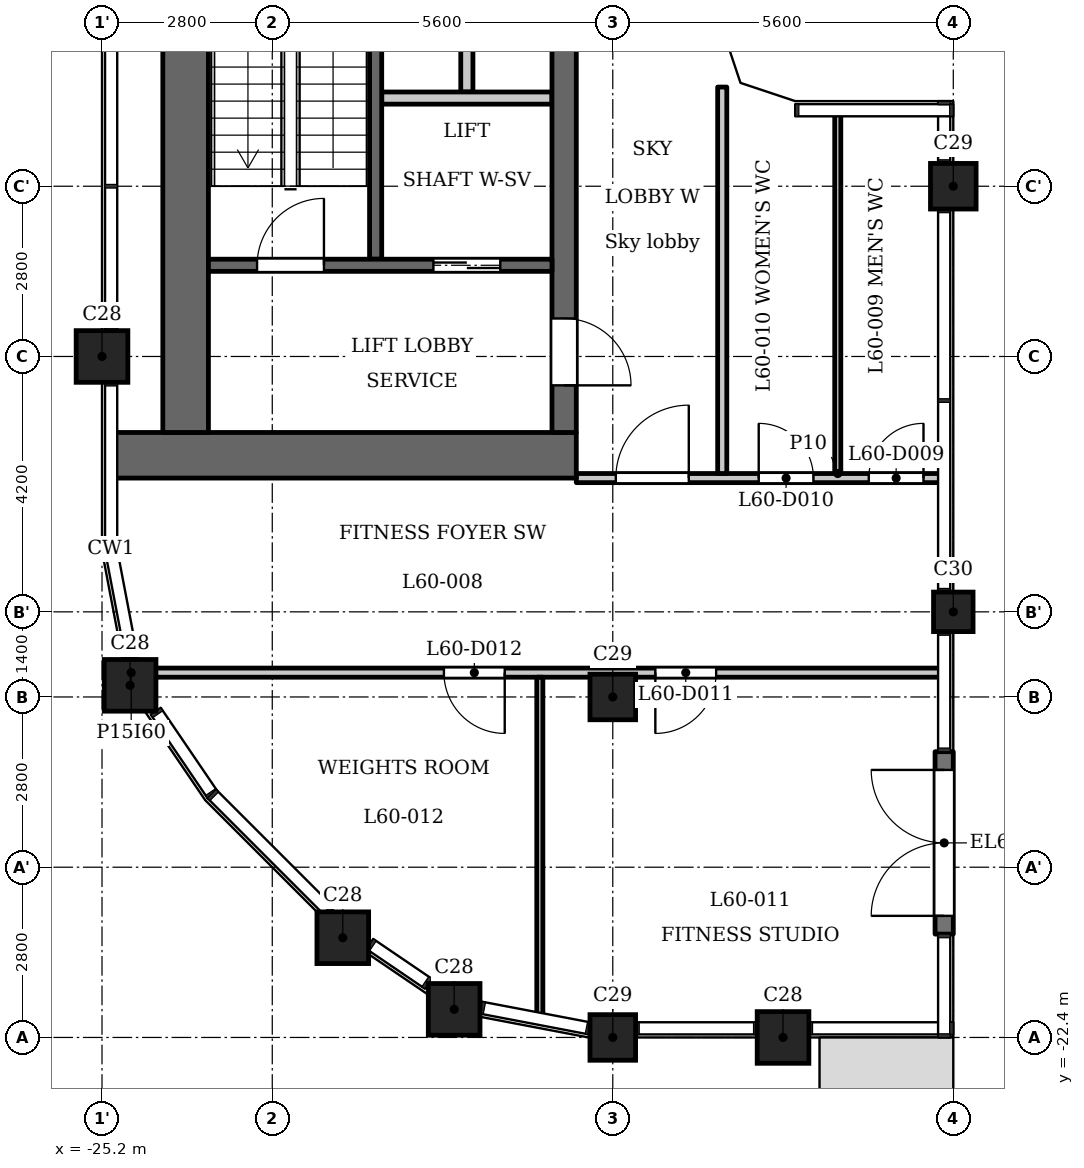
"""IFC4 building model, lengths in metres.
Left out: names, types, materials, properties, quantities, classifications, styles, units other than length and angle.
Written with IfcOpenShell. Run it as: python <this file> out.ifc"""

import sys

from ifc_helpers import new_model, si_unit, direction, frame, frame_2d, origin, origin_2d, place, context, subcontext, project, spatial, polyline, rectangle, outline, extrude, element, fill, save


model = new_model("IFC4")
c1 = context("Model", 3, precision=1e-05, world=origin(), true_north=direction((0.0, 1.0)))
c2 = subcontext(c1, "Body", "Model", "MODEL_VIEW")
j1 = project(units=[si_unit("LENGTHUNIT", "METRE"), si_unit("PLANEANGLEUNIT", "RADIAN")], contexts=[c1])
p1 = place(None, origin())
s1 = spatial("IfcSite", under=j1, at=p1, CompositionType="ELEMENT")
p2 = place(p1, origin())
s2 = spatial("IfcBuilding", under=s1, at=p2, CompositionType="ELEMENT")
p3 = place(p2, frame((0.0, 0.0, 230.9)))
s3 = spatial("IfcBuildingStorey", under=s2, at=p3, CompositionType="ELEMENT", Elevation=230.9)
for number, where, z_axis, x_axis in (
    (1, (-19.409, -21.938, 0.0), (0.0, 0.0, 1.0), (1.0, 0.0, 0.0)),
    (2, (-14.0, -22.4, 0.0), (0.0, 0.0, 1.0), (1.0, 0.0, 0.0)),
    (3, (-25.2, -11.2, 0.0), (0.0, 0.0, 1.0), (1.0, 0.0, 0.0)),
    (4, (-24.738, -16.609, 0.0), (0.0, 0.0, 1.0), (1.0, 0.0, 0.0)),
    (5, (-21.24, -20.76, 0.0), (0.0, 0.0, 1.0), (1.0, 0.0, 0.0)),
):
    element("IfcColumn", number, at=place(p3, frame(where, z_axis=z_axis, x_axis=x_axis)), inside=s3, PredefinedType="COLUMN", context=c2, shape_type="SweptSolid", body=[
        extrude(rectangle(XDim=0.85, YDim=0.85, at=origin_2d()), origin(), (0.0, 0.0, 1.0), 5.4),
    ])
for number, where, z_axis, x_axis in (
    (6, (-16.8, -22.4, 0.0), (0.0, 0.0, 1.0), (1.0, 0.0, 0.0)),
    (7, (-16.8, -16.8, 0.0), (0.0, 0.0, 1.0), (1.0, 0.0, 0.0)),
    (8, (-11.2, -8.4, 0.0), (0.0, 0.0, 1.0), (1.0, 0.0, 0.0)),
):
    element("IfcColumn", number, at=place(p3, frame(where, z_axis=z_axis, x_axis=x_axis)), inside=s3, PredefinedType="COLUMN", context=c2, shape_type="SweptSolid", body=[
        extrude(rectangle(XDim=0.75, YDim=0.75, at=origin_2d()), origin(), (0.0, 0.0, 1.0), 5.4),
    ])
p4 = place(p3, frame((-11.2, -15.4, 0.0), z_axis=(0.0, 0.0, 1.0), x_axis=(1.0, 0.0, 0.0)))
e9 = element("IfcColumn", 9, at=p4, inside=s3, PredefinedType="COLUMN", context=c2, shape_type="SweptSolid", body=[
    extrude(rectangle(XDim=0.65, YDim=0.65, at=origin_2d()), origin(), (0.0, 0.0, 1.0), 5.4),
])
p5 = place(p3, frame((-11.35, -20.7, 0.0), z_axis=(0.0, 0.0, 1.0), x_axis=(0.0, 1.0, 0.0)))
e10 = element("IfcWall", 10, at=p5, inside=s3, PredefinedType="SOLIDWALL", context=c2, shape_type="SweptSolid", body=[
    extrude(rectangle(XDim=3.0, YDim=0.3, at=frame_2d((1.5, 0.0))), origin(), (0.0, 0.0, 1.0), 4.95),
])
p6 = place(p5, frame((0.3, 0.0, 0.0)))
e11 = element("IfcOpeningElement", 11, at=p6, cuts=e10, PredefinedType="OPENING", context=c2, shape_type="SweptSolid", body=[
    extrude(rectangle(XDim=2.4, YDim=2.3, at=frame_2d((1.2, 1.15))), frame((0.0, 0.16, 0.0), z_axis=(0.0, -1.0, 0.0), x_axis=(1.0, 0.0, 0.0)), (0.0, 0.0, 1.0), 0.32),
])
p7 = place(p3, frame((-20.7, -9.6, 0.0), z_axis=(0.0, 0.0, 1.0), x_axis=(0.0, 1.0, 0.0)))
e12 = element("IfcWall", 12, at=p7, inside=s3, PredefinedType="SHEAR", context=c2, shape_type="SweptSolid", body=[
    extrude(rectangle(XDim=9.75, YDim=0.2, at=frame_2d((4.875, 0.0))), origin(), (0.0, 0.0, 1.0), 4.95),
])
p8 = place(p3, frame((-17.4, -12.825, 0.0), z_axis=(0.0, 0.0, 1.0), x_axis=(-1.0, 0.0, 0.0)))
e13 = element("IfcWall", 13, at=p8, inside=s3, PredefinedType="SHEAR", context=c2, shape_type="SweptSolid", body=[
    extrude(rectangle(XDim=7.6, YDim=0.75, at=frame_2d((3.8, 0.0))), origin(), (0.0, 0.0, 1.0), 4.95),
])
p9 = place(p3, frame((-19.2, -6.85, 0.0), z_axis=(0.0, 0.0, 1.0), x_axis=(0.0, 1.0, 0.0)))
e14 = element("IfcWall", 14, at=p9, inside=s3, PredefinedType="PARTITIONING", context=c2, shape_type="SweptSolid", body=[
    extrude(rectangle(XDim=7.0, YDim=0.2, at=frame_2d((3.5, 0.0))), origin(), (0.0, 0.0, 1.0), 4.95),
])
p10 = place(p3, frame((-17.6, -12.45, 0.0), z_axis=(0.0, 0.0, 1.0), x_axis=(0.0, 1.0, 0.0)))
e15 = element("IfcWall", 15, at=p10, inside=s3, PredefinedType="SHEAR", context=c2, shape_type="SweptSolid", body=[
    extrude(rectangle(XDim=24.9, YDim=0.4, at=frame_2d((12.45, 0.0))), origin(), (0.0, 0.0, 1.0), 4.95),
])
p11 = place(p10, frame((8.65, 0.0, 0.0)))
e16 = element("IfcOpeningElement", 16, at=p11, cuts=e15, PredefinedType="OPENING", context=c2, shape_type="SweptSolid", body=[
    extrude(rectangle(XDim=0.9, YDim=2.1, at=frame_2d((0.45, 1.05))), frame((0.0, 0.21, 0.0), z_axis=(0.0, -1.0, 0.0), x_axis=(1.0, 0.0, 0.0)), (0.0, 0.0, 1.0), 0.42),
])
p12 = place(p10, frame((15.6, 0.0, 0.0)))
e17 = element("IfcOpeningElement", 17, at=p12, cuts=e15, PredefinedType="OPENING", context=c2, shape_type="SweptSolid", body=[
    extrude(rectangle(XDim=1.1, YDim=2.1, at=frame_2d((0.55, 1.05))), frame((0.0, 0.21, 0.0), z_axis=(0.0, -1.0, 0.0), x_axis=(1.0, 0.0, 0.0)), (0.0, 0.0, 1.0), 0.42),
])
p13 = place(p10, frame((18.0, 0.0, 0.0)))
e18 = element("IfcOpeningElement", 18, at=p13, cuts=e15, PredefinedType="OPENING", context=c2, shape_type="SweptSolid", body=[
    extrude(rectangle(XDim=1.1, YDim=2.1, at=frame_2d((0.55, 1.05))), frame((0.0, 0.21, 0.0), z_axis=(0.0, -1.0, 0.0), x_axis=(1.0, 0.0, 0.0)), (0.0, 0.0, 1.0), 0.42),
])
p14 = place(p10, frame((23.025, 0.0, 0.0)))
e19 = element("IfcOpeningElement", 19, at=p14, cuts=e15, PredefinedType="OPENING", context=c2, shape_type="SweptSolid", body=[
    extrude(rectangle(XDim=1.1, YDim=2.1, at=frame_2d((0.55, 1.05))), frame((0.0, 0.21, 0.0), z_axis=(0.0, -1.0, 0.0), x_axis=(1.0, 0.0, 0.0)), (0.0, 0.0, 1.0), 0.42),
])
p15 = place(p10, frame((0.775, 0.0, 0.0)))
e20 = element("IfcOpeningElement", 20, at=p15, cuts=e15, PredefinedType="OPENING", context=c2, shape_type="SweptSolid", body=[
    extrude(rectangle(XDim=1.1, YDim=2.1, at=frame_2d((0.55, 1.05))), frame((0.0, 0.21, 0.0), z_axis=(0.0, -1.0, 0.0), x_axis=(1.0, 0.0, 0.0)), (0.0, 0.0, 1.0), 0.42),
])
p16 = place(p10, frame((12.925, 0.0, 0.0)))
e21 = element("IfcOpeningElement", 21, at=p16, cuts=e15, PredefinedType="OPENING", context=c2, shape_type="SweptSolid", body=[
    extrude(rectangle(XDim=1.8, YDim=2.1, at=frame_2d((0.9, 1.05))), frame((0.0, 0.21, 0.0), z_axis=(0.0, -1.0, 0.0), x_axis=(1.0, 0.0, 0.0)), (0.0, 0.0, 1.0), 0.42),
])
p17 = place(p3, frame((-23.825, -12.45, 0.0), z_axis=(0.0, 0.0, 1.0), x_axis=(0.0, 1.0, 0.0)))
e22 = element("IfcWall", 22, at=p17, inside=s3, PredefinedType="SHEAR", context=c2, shape_type="SweptSolid", body=[
    extrude(rectangle(XDim=24.9, YDim=0.75, at=frame_2d((12.45, 0.0))), origin(), (0.0, 0.0, 1.0), 4.95),
])
p18 = place(p3, frame((-17.8, -9.7, 0.0), z_axis=(0.0, 0.0, 1.0), x_axis=(-1.0, 0.0, 0.0)))
e23 = element("IfcWall", 23, at=p18, inside=s3, PredefinedType="SHEAR", context=c2, shape_type="SweptSolid", body=[
    extrude(rectangle(XDim=5.65, YDim=0.2, at=frame_2d((2.825, 0.0))), origin(), (0.0, 0.0, 1.0), 4.95),
])
p19 = place(p18, frame((0.85, 0.0, 0.0)))
e24 = element("IfcOpeningElement", 24, at=p19, cuts=e23, PredefinedType="OPENING", context=c2, shape_type="SweptSolid", body=[
    extrude(rectangle(XDim=1.1, YDim=2.1, at=frame_2d((0.55, 1.05))), frame((0.0, 0.11, 0.0), z_axis=(0.0, -1.0, 0.0), x_axis=(1.0, 0.0, 0.0)), (0.0, 0.0, 1.0), 0.22),
])
p20 = place(p18, frame((3.75, 0.0, 0.0)))
e25 = element("IfcOpeningElement", 25, at=p20, cuts=e23, PredefinedType="OPENING", context=c2, shape_type="SweptSolid", body=[
    extrude(rectangle(XDim=1.1, YDim=2.1, at=frame_2d((0.55, 1.05))), frame((0.0, 0.11, 0.0), z_axis=(0.0, -1.0, 0.0), x_axis=(1.0, 0.0, 0.0)), (0.0, 0.0, 1.0), 0.22),
])
p21 = place(p3, frame((-17.8, -6.95, 0.0), z_axis=(0.0, 0.0, 1.0), x_axis=(-1.0, 0.0, 0.0)))
e26 = element("IfcWall", 26, at=p21, inside=s3, PredefinedType="PARTITIONING", context=c2, shape_type="SweptSolid", body=[
    extrude(rectangle(XDim=2.8, YDim=0.2, at=frame_2d((1.4, 0.0))), origin(), (0.0, 0.0, 1.0), 4.95),
])
p22 = place(p3, frame((-24.72, -16.4, 0.0), z_axis=(0.0, 0.0, 1.0), x_axis=(1.0, 0.0, 0.0)))
e27 = element("IfcWall", 27, at=p22, inside=s3, PredefinedType="PARTITIONING", context=c2, shape_type="SweptSolid", body=[
    extrude(rectangle(XDim=13.336, YDim=0.15, at=frame_2d((6.668, 0.0))), origin(), (0.0, 0.0, 1.0), 4.95),
])
p23 = place(p22, frame((8.62, 0.0, 0.0)))
e28 = element("IfcOpeningElement", 28, at=p23, cuts=e27, PredefinedType="OPENING", context=c2, shape_type="SweptSolid", body=[
    extrude(rectangle(XDim=1.0, YDim=2.1, at=frame_2d((0.5, 1.05))), frame((0.0, 0.085, 0.0), z_axis=(0.0, -1.0, 0.0), x_axis=(1.0, 0.0, 0.0)), (0.0, 0.0, 1.0), 0.17),
])
p24 = place(p22, frame((5.143, 0.0, 0.0)))
e29 = element("IfcOpeningElement", 29, at=p24, cuts=e27, PredefinedType="OPENING", context=c2, shape_type="SweptSolid", body=[
    extrude(rectangle(XDim=1.0, YDim=2.1, at=frame_2d((0.5, 1.05))), frame((0.0, 0.085, 0.0), z_axis=(0.0, -1.0, 0.0), x_axis=(1.0, 0.0, 0.0)), (0.0, 0.0, 1.0), 0.17),
])
p25 = place(p3, frame((-17.4, -13.2, 0.0), z_axis=(0.0, 0.0, 1.0), x_axis=(1.0, 0.0, 0.0)))
e30 = element("IfcWall", 30, at=p25, inside=s3, PredefinedType="PARTITIONING", context=c2, shape_type="SweptSolid", body=[
    extrude(rectangle(XDim=6.016, YDim=0.15, at=frame_2d((3.008, 0.0))), origin(), (0.0, 0.0, 1.0), 4.95),
])
p26 = place(p25, frame((0.65, 0.0, 0.0)))
e31 = element("IfcOpeningElement", 31, at=p26, cuts=e30, PredefinedType="OPENING", context=c2, shape_type="SweptSolid", body=[
    extrude(rectangle(XDim=1.2, YDim=2.1, at=frame_2d((0.6, 1.05))), frame((0.0, 0.085, 0.0), z_axis=(0.0, -1.0, 0.0), x_axis=(1.0, 0.0, 0.0)), (0.0, 0.0, 1.0), 0.17),
])
p27 = place(p25, frame((4.81, 0.0, 0.0)))
e32 = element("IfcOpeningElement", 32, at=p27, cuts=e30, PredefinedType="OPENING", context=c2, shape_type="SweptSolid", body=[
    extrude(rectangle(XDim=0.9, YDim=2.1, at=frame_2d((0.45, 1.05))), frame((0.0, 0.085, 0.0), z_axis=(0.0, -1.0, 0.0), x_axis=(1.0, 0.0, 0.0)), (0.0, 0.0, 1.0), 0.17),
])
p28 = place(p25, frame((3.0, 0.0, 0.0)))
e33 = element("IfcOpeningElement", 33, at=p28, cuts=e30, PredefinedType="OPENING", context=c2, shape_type="SweptSolid", body=[
    extrude(rectangle(XDim=0.9, YDim=2.1, at=frame_2d((0.45, 1.05))), frame((0.0, 0.085, 0.0), z_axis=(0.0, -1.0, 0.0), x_axis=(1.0, 0.0, 0.0)), (0.0, 0.0, 1.0), 0.17),
])
p29 = place(p3, frame((-18.0, -22.06, 0.0), z_axis=(0.0, 0.0, 1.0), x_axis=(0.0, 1.0, 0.0)))
e34 = element("IfcWall", 34, at=p29, inside=s3, PredefinedType="PARTITIONING", context=c2, shape_type="SweptSolid", body=[
    extrude(rectangle(XDim=5.585, YDim=0.1, at=frame_2d((2.792, 0.0))), origin(), (0.0, 0.0, 1.0), 4.95),
])
p30 = place(p3, frame((-15.0, -13.125, 0.0), z_axis=(0.0, 0.0, 1.0), x_axis=(0.0, 1.0, 0.0)))
e35 = element("IfcWall", 35, at=p30, inside=s3, PredefinedType="PARTITIONING", context=c2, shape_type="SweptSolid", body=[
    extrude(rectangle(XDim=6.356, YDim=0.15, at=frame_2d((3.178, 0.0))), origin(), (0.0, 0.0, 1.0), 4.95),
])
p31 = place(p3, frame((-13.1, -13.125, 0.0), z_axis=(0.0, 0.0, 1.0), x_axis=(0.0, 1.0, 0.0)))
e36 = element("IfcWall", 36, at=p31, inside=s3, PredefinedType="PARTITIONING", context=c2, shape_type="SweptSolid", body=[
    extrude(rectangle(XDim=5.941, YDim=0.1, at=frame_2d((2.97, 0.0))), origin(), (0.0, 0.0, 1.0), 4.95),
])
p32 = place(p3, origin())
e37 = element("IfcWall", 37, at=p32, inside=s3, PredefinedType="SOLIDWALL", context=c2, shape_type="SweptSolid", body=[
    extrude(outline(polyline([(-13.8, -7.0), (-14.7, -6.7), (-15.0, -5.8), (-15.3, -5.8), (-15.3, -5.849), (-14.937, -6.937), (-13.849, -7.3), (-13.8, -7.3), (-13.8, -7.0)])), origin(), (0.0, 0.0, 1.0), 4.95),
])
p33 = place(p6, origin())
e38 = element("IfcDoor", 38, at=p33, inside=s3, OperationType="SINGLE_SWING_LEFT", PredefinedType="DOOR", context=c2, shape_type="SweptSolid", body=[
    extrude(rectangle(XDim=2.4, YDim=2.3, at=frame_2d((1.2, 1.15))), frame((0.0, 0.025, 0.0), z_axis=(0.0, -1.0, 0.0), x_axis=(1.0, 0.0, 0.0)), (0.0, 0.0, 1.0), 0.05),
])
fill(e11, e38)
p34 = place(p19, origin())
e39 = element("IfcDoor", 39, at=p34, inside=s3, OperationType="DOUBLE_DOOR_SLIDING", PredefinedType="DOOR", context=c2, shape_type="SweptSolid", body=[
    extrude(rectangle(XDim=1.1, YDim=2.1, at=frame_2d((0.55, 1.05))), frame((0.0, 0.025, 0.0), z_axis=(0.0, -1.0, 0.0), x_axis=(1.0, 0.0, 0.0)), (0.0, 0.0, 1.0), 0.05),
])
fill(e24, e39)
p35 = place(p15, origin())
e40 = element("IfcDoor", 40, at=p35, inside=s3, OperationType="SINGLE_SWING_LEFT", PredefinedType="DOOR", context=c2, shape_type="SweptSolid", body=[
    extrude(rectangle(XDim=1.1, YDim=2.1, at=frame_2d((0.55, 1.05))), frame((0.0, 0.025, 0.0), z_axis=(0.0, -1.0, 0.0), x_axis=(1.0, 0.0, 0.0)), (0.0, 0.0, 1.0), 0.05),
])
fill(e20, e40)
p36 = place(p20, origin())
e41 = element("IfcDoor", 41, at=p36, inside=s3, OperationType="SINGLE_SWING_LEFT", PredefinedType="DOOR", context=c2, shape_type="SweptSolid", body=[
    extrude(rectangle(XDim=1.1, YDim=2.1, at=frame_2d((0.55, 1.05))), frame((0.0, 0.025, 0.0), z_axis=(0.0, -1.0, 0.0), x_axis=(1.0, 0.0, 0.0)), (0.0, 0.0, 1.0), 0.05),
])
fill(e25, e41)
p37 = place(p26, origin())
e42 = element("IfcDoor", 42, at=p37, inside=s3, OperationType="SINGLE_SWING_LEFT", PredefinedType="DOOR", context=c2, shape_type="SweptSolid", body=[
    extrude(rectangle(XDim=1.2, YDim=2.1, at=frame_2d((0.6, 1.05))), frame((0.0, 0.025, 0.0), z_axis=(0.0, -1.0, 0.0), x_axis=(1.0, 0.0, 0.0)), (0.0, 0.0, 1.0), 0.05),
])
fill(e31, e42)
p38 = place(p27, origin())
e43 = element("IfcDoor", 43, at=p38, inside=s3, OperationType="SINGLE_SWING_LEFT", PredefinedType="DOOR", context=c2, shape_type="SweptSolid", body=[
    extrude(rectangle(XDim=0.9, YDim=2.1, at=frame_2d((0.45, 1.05))), frame((0.0, 0.025, 0.0), z_axis=(0.0, -1.0, 0.0), x_axis=(1.0, 0.0, 0.0)), (0.0, 0.0, 1.0), 0.05),
])
fill(e32, e43)
p39 = place(p28, origin())
e44 = element("IfcDoor", 44, at=p39, inside=s3, OperationType="SINGLE_SWING_RIGHT", PredefinedType="DOOR", context=c2, shape_type="SweptSolid", body=[
    extrude(rectangle(XDim=0.9, YDim=2.1, at=frame_2d((0.45, 1.05))), frame((0.0, 0.025, 0.0), z_axis=(0.0, -1.0, 0.0), x_axis=(1.0, 0.0, 0.0)), (0.0, 0.0, 1.0), 0.05),
])
fill(e33, e44)
p40 = place(p23, origin())
e45 = element("IfcDoor", 45, at=p40, inside=s3, OperationType="SINGLE_SWING_LEFT", PredefinedType="DOOR", context=c2, shape_type="SweptSolid", body=[
    extrude(rectangle(XDim=1.0, YDim=2.1, at=frame_2d((0.5, 1.05))), frame((0.0, 0.025, 0.0), z_axis=(0.0, -1.0, 0.0), x_axis=(1.0, 0.0, 0.0)), (0.0, 0.0, 1.0), 0.05),
])
fill(e28, e45)
p41 = place(p24, origin())
e46 = element("IfcDoor", 46, at=p41, inside=s3, OperationType="SINGLE_SWING_RIGHT", PredefinedType="DOOR", context=c2, shape_type="SweptSolid", body=[
    extrude(rectangle(XDim=1.0, YDim=2.1, at=frame_2d((0.5, 1.05))), frame((0.0, 0.025, 0.0), z_axis=(0.0, -1.0, 0.0), x_axis=(1.0, 0.0, 0.0)), (0.0, 0.0, 1.0), 0.05),
])
fill(e29, e46)
save(model, sys.argv[1])
